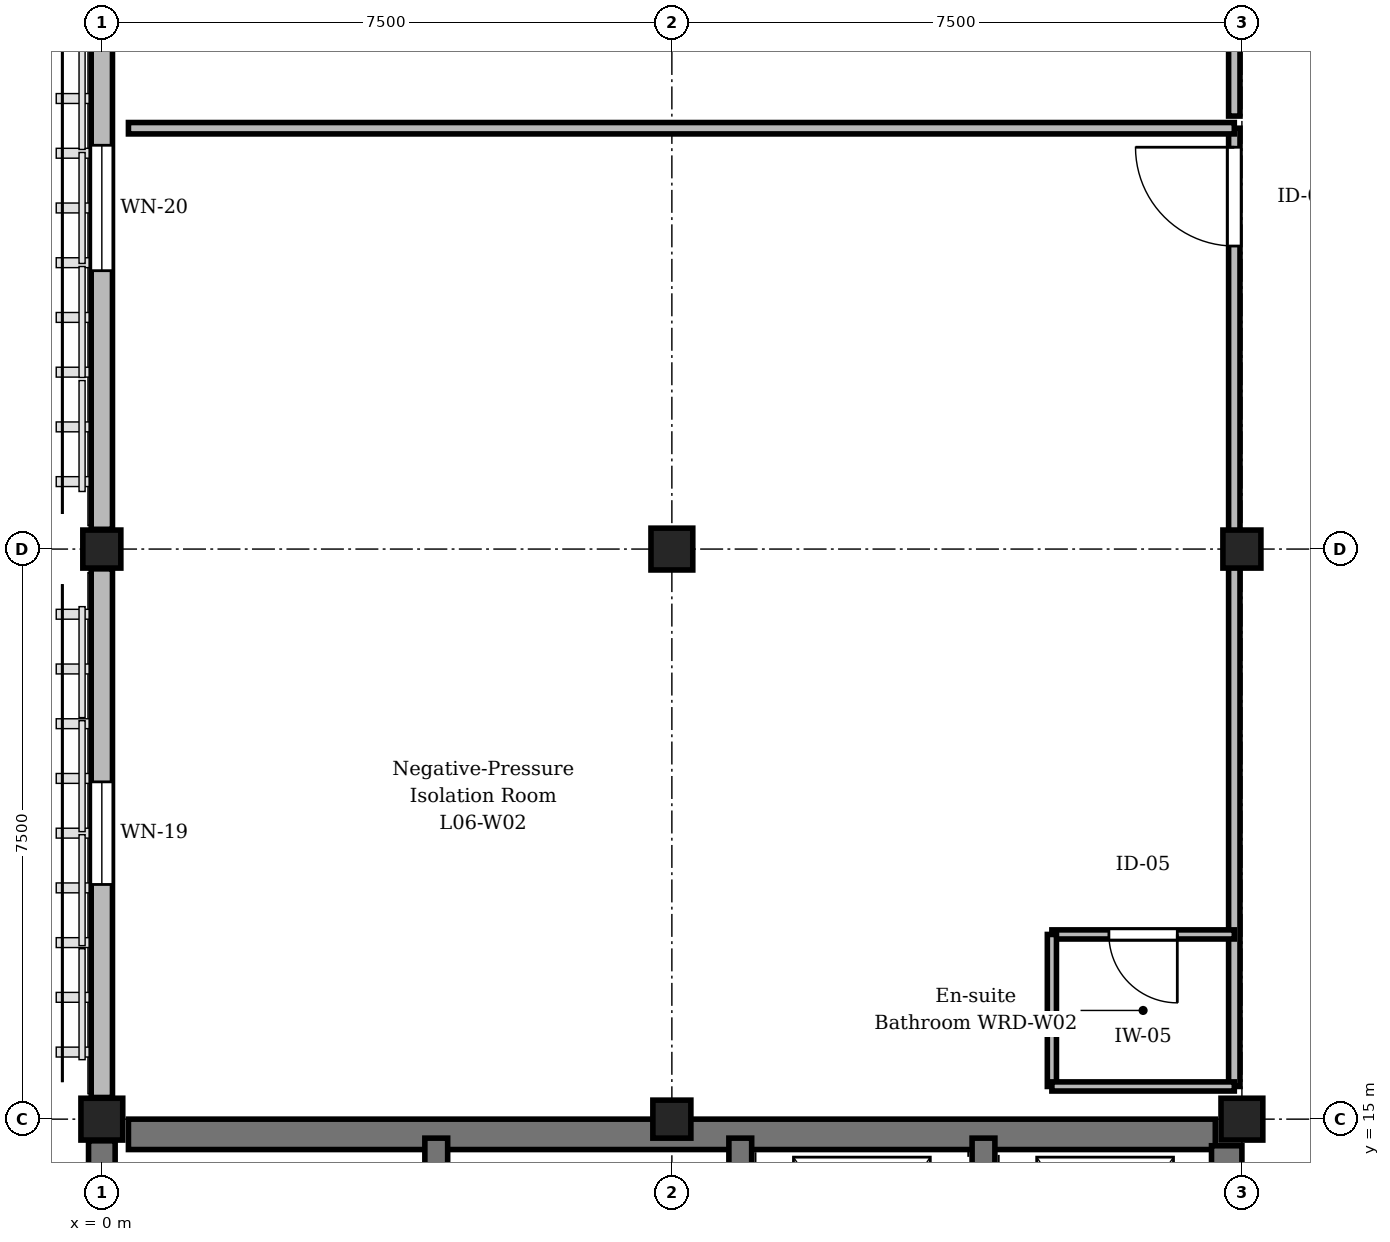
"""IFC4 building model, lengths in metres.
Left out: names, types, materials, properties, quantities, classifications, styles, units other than length and angle.
Written with IfcOpenShell. Run it as: python <this file> out.ifc"""

import sys

from ifc_helpers import new_model, si_unit, direction, frame, frame_2d, origin, origin_2d, place, context, subcontext, project, spatial, rectangle, extrude, element, fill, save


model = new_model("IFC4")
c1 = context("Model", 3, precision=1e-05, world=origin(), true_north=direction((0.0, 1.0)))
c2 = subcontext(c1, "Body", "Model", "MODEL_VIEW")
j1 = project(units=[si_unit("LENGTHUNIT", "METRE"), si_unit("PLANEANGLEUNIT", "RADIAN")], contexts=[c1])
p1 = place(None, origin())
s1 = spatial("IfcSite", under=j1, at=p1, CompositionType="ELEMENT")
p2 = place(p1, origin())
s2 = spatial("IfcBuilding", under=s1, at=p2, CompositionType="ELEMENT")
p3 = place(p2, frame((0.0, 0.0, 25.95)))
s3 = spatial("IfcBuildingStorey", under=s2, at=p3, CompositionType="ELEMENT", Elevation=25.95)
p4 = place(p3, frame((0.0, 15.0, 0.0), z_axis=(0.0, 0.0, 1.0), x_axis=(1.0, 0.0, 0.0)))
e1 = element("IfcColumn", 1, at=p4, inside=s3, PredefinedType="COLUMN", context=c2, shape_type="SweptSolid", body=[
    extrude(rectangle(XDim=0.55, YDim=0.55, at=origin_2d()), origin(), (0.0, 0.0, 1.0), 4.05),
])
for number, where, z_axis, x_axis in (
    (2, (0.0, 22.5, 0.0), (0.0, 0.0, 1.0), (1.0, 0.0, 0.0)),
    (3, (7.5, 15.0, 0.0), (0.0, 0.0, 1.0), (1.0, 0.0, 0.0)),
):
    element("IfcColumn", number, at=place(p3, frame(where, z_axis=z_axis, x_axis=x_axis)), inside=s3, PredefinedType="COLUMN", context=c2, shape_type="SweptSolid", body=[
        extrude(rectangle(XDim=0.5, YDim=0.5, at=origin_2d()), origin(), (0.0, 0.0, 1.0), 4.05),
    ])
for number, where, z_axis, x_axis in (
    (4, (7.5, 22.5, 0.0), (0.0, 0.0, 1.0), (1.0, 0.0, 0.0)),
    (5, (15.0, 15.0, 0.0), (0.0, 0.0, 1.0), (1.0, 0.0, 0.0)),
):
    element("IfcColumn", number, at=place(p3, frame(where, z_axis=z_axis, x_axis=x_axis)), inside=s3, PredefinedType="COLUMN", context=c2, shape_type="SweptSolid", body=[
        extrude(rectangle(XDim=0.55, YDim=0.55, at=origin_2d()), origin(), (0.0, 0.0, 1.0), 4.05),
    ])
p5 = place(p3, frame((15.0, 22.5, 0.0), z_axis=(0.0, 0.0, 1.0), x_axis=(1.0, 0.0, 0.0)))
e6 = element("IfcColumn", 6, at=p5, inside=s3, PredefinedType="COLUMN", context=c2, shape_type="SweptSolid", body=[
    extrude(rectangle(XDim=0.5, YDim=0.5, at=origin_2d()), origin(), (0.0, 0.0, 1.0), 4.05),
])
p6 = place(p3, frame((0.0, 7.76, 0.0), z_axis=(0.0, 0.0, 1.0), x_axis=(0.0, 1.0, 0.0)))
e7 = element("IfcWall", 7, at=p6, inside=s3, PredefinedType="SHEAR", context=c2, shape_type="SweptSolid", body=[
    extrude(rectangle(XDim=6.955, YDim=0.35, at=frame_2d((3.478, 0.0))), origin(), (0.0, 0.0, 1.0), 3.77),
])
p7 = place(p3, frame((0.0, 15.285, 0.0), z_axis=(0.0, 0.0, 1.0), x_axis=(0.0, 1.0, 0.0)))
e8 = element("IfcWall", 8, at=p7, inside=s3, PredefinedType="STANDARD", context=c2, shape_type="SweptSolid", body=[
    extrude(rectangle(XDim=6.955, YDim=0.28, at=frame_2d((3.478, 0.0))), origin(), (0.0, 0.0, 1.0), 3.17),
])
p8 = place(p7, frame((2.802, 0.0, 0.85)))
e9 = element("IfcOpeningElement", 9, at=p8, cuts=e8, PredefinedType="OPENING", context=c2, shape_type="SweptSolid", body=[
    extrude(rectangle(XDim=1.35, YDim=2.04, at=frame_2d((0.675, 1.02))), frame((0.0, 0.15, 0.0), z_axis=(0.0, -1.0, 0.0), x_axis=(1.0, 0.0, 0.0)), (0.0, 0.0, 1.0), 0.3),
])
p9 = place(p3, frame((0.0, 22.76, 0.0), z_axis=(0.0, 0.0, 1.0), x_axis=(0.0, 1.0, 0.0)))
e10 = element("IfcWall", 10, at=p9, inside=s3, PredefinedType="STANDARD", context=c2, shape_type="SweptSolid", body=[
    extrude(rectangle(XDim=8.455, YDim=0.28, at=frame_2d((4.228, 0.0))), origin(), (0.0, 0.0, 1.0), 3.22),
])
p10 = place(p9, frame((3.403, 0.0, 0.85)))
e11 = element("IfcOpeningElement", 11, at=p10, cuts=e10, PredefinedType="OPENING", context=c2, shape_type="SweptSolid", body=[
    extrude(rectangle(XDim=1.65, YDim=2.09, at=frame_2d((0.825, 1.045))), frame((0.0, 0.15, 0.0), z_axis=(0.0, -1.0, 0.0), x_axis=(1.0, 0.0, 0.0)), (0.0, 0.0, 1.0), 0.3),
])
p11 = place(p3, frame((0.35, 14.8, 0.0), z_axis=(0.0, 0.0, 1.0), x_axis=(1.0, 0.0, 0.0)))
e12 = element("IfcWall", 12, at=p11, inside=s3, PredefinedType="SHEAR", context=c2, shape_type="SweptSolid", body=[
    extrude(rectangle(XDim=14.3, YDim=0.4, at=frame_2d((7.15, 0.0))), origin(), (0.0, 0.0, 1.0), 3.77),
])
p12 = place(p3, frame((14.8, 11.6, 0.0), z_axis=(0.0, 0.0, 1.0), x_axis=(0.0, 1.0, 0.0)))
e13 = element("IfcWall", 13, at=p12, inside=s3, PredefinedType="SHEAR", context=c2, shape_type="SweptSolid", body=[
    extrude(rectangle(XDim=3.05, YDim=0.4, at=frame_2d((1.525, 0.0))), origin(), (0.0, 0.0, 1.0), 3.77),
])
for number, where, z_axis, x_axis in (
    (14, (4.4, 11.6, 0.0), (0.0, 0.0, 1.0), (0.0, 1.0, 0.0)),
    (15, (8.4, 11.6, 0.0), (0.0, 0.0, 1.0), (0.0, 1.0, 0.0)),
    (16, (11.6, 11.6, 0.0), (0.0, 0.0, 1.0), (0.0, 1.0, 0.0)),
):
    element("IfcWall", number, at=place(p3, frame(where, z_axis=z_axis, x_axis=x_axis)), inside=s3, PredefinedType="SHEAR", context=c2, shape_type="SweptSolid", body=[
        extrude(rectangle(XDim=3.15, YDim=0.3, at=frame_2d((1.575, 0.0))), origin(), (0.0, 0.0, 1.0), 3.77),
    ])
p13 = place(p3, frame((14.9, 15.43, 0.0), z_axis=(0.0, 0.0, 1.0), x_axis=(0.0, 1.0, 0.0)))
e17 = element("IfcWall", 17, at=p13, inside=s3, PredefinedType="PARTITIONING", context=c2, shape_type="SweptSolid", body=[
    extrude(rectangle(XDim=12.607, YDim=0.15, at=frame_2d((6.303, 0.0))), origin(), (0.0, 0.0, 1.0), 3.055),
])
p14 = place(p13, frame((11.057, 0.0, 0.0)))
e18 = element("IfcOpeningElement", 18, at=p14, cuts=e17, PredefinedType="OPENING", context=c2, shape_type="SweptSolid", body=[
    extrude(rectangle(XDim=1.3, YDim=2.2, at=frame_2d((0.65, 1.1))), frame((0.0, 0.085, 0.0), z_axis=(0.0, -1.0, 0.0), x_axis=(1.0, 0.0, 0.0)), (0.0, 0.0, 1.0), 0.17),
])
p15 = place(p3, frame((14.9, 17.43, 0.0), z_axis=(0.0, 0.0, 1.0), x_axis=(-1.0, 0.0, 0.0)))
e19 = element("IfcWall", 19, at=p15, inside=s3, PredefinedType="PARTITIONING", context=c2, shape_type="SweptSolid", body=[
    extrude(rectangle(XDim=2.4, YDim=0.12, at=frame_2d((1.2, 0.0))), origin(), (0.0, 0.0, 1.0), 3.755),
])
p16 = place(p15, frame((0.75, 0.0, 0.0)))
e20 = element("IfcOpeningElement", 20, at=p16, cuts=e19, PredefinedType="OPENING", context=c2, shape_type="SweptSolid", body=[
    extrude(rectangle(XDim=0.9, YDim=2.1, at=frame_2d((0.45, 1.05))), frame((0.0, 0.07, 0.0), z_axis=(0.0, -1.0, 0.0), x_axis=(1.0, 0.0, 0.0)), (0.0, 0.0, 1.0), 0.14),
])
p17 = place(p3, frame((12.5, 15.43, 0.0), z_axis=(0.0, 0.0, 1.0), x_axis=(0.0, 1.0, 0.0)))
e21 = element("IfcWall", 21, at=p17, inside=s3, PredefinedType="PARTITIONING", context=c2, shape_type="SweptSolid", body=[
    extrude(rectangle(XDim=2.0, YDim=0.12, at=frame_2d((1.0, 0.0))), origin(), (0.0, 0.0, 1.0), 3.755),
])
p18 = place(p3, frame((14.9, 28.197, 0.0), z_axis=(0.0, 0.0, 1.0), x_axis=(0.0, 1.0, 0.0)))
e22 = element("IfcWall", 22, at=p18, inside=s3, PredefinedType="PARTITIONING", context=c2, shape_type="SweptSolid", body=[
    extrude(rectangle(XDim=12.606, YDim=0.15, at=frame_2d((6.303, 0.0))), origin(), (0.0, 0.0, 1.0), 3.055),
])
p19 = place(p18, frame((6.704, 0.0, 0.0)))
e23 = element("IfcOpeningElement", 23, at=p19, cuts=e22, PredefinedType="OPENING", context=c2, shape_type="SweptSolid", body=[
    extrude(rectangle(XDim=1.35, YDim=2.25, at=frame_2d((0.675, 1.125))), frame((0.0, 0.085, 0.0), z_axis=(0.0, -1.0, 0.0), x_axis=(1.0, 0.0, 0.0)), (0.0, 0.0, 1.0), 0.17),
])
p20 = place(p3, frame((0.35, 28.037, 0.0), z_axis=(0.0, 0.0, 1.0), x_axis=(1.0, 0.0, 0.0)))
e24 = element("IfcWall", 24, at=p20, inside=s3, PredefinedType="PARTITIONING", context=c2, shape_type="SweptSolid", body=[
    extrude(rectangle(XDim=14.55, YDim=0.15, at=frame_2d((7.275, 0.0))), origin(), (0.0, 0.0, 1.0), 3.755),
])
p21 = place(p3, frame((12.5, 15.43, 0.0), z_axis=(0.0, 0.0, 1.0), x_axis=(1.0, 0.0, 0.0)))
e25 = element("IfcWall", 25, at=p21, inside=s3, PredefinedType="PARTITIONING", context=c2, shape_type="SweptSolid", body=[
    extrude(rectangle(XDim=2.4, YDim=0.12, at=frame_2d((1.2, 0.0))), origin(), (0.0, 0.0, 1.0), 3.755),
])
p22 = place(p8, origin())
e26 = element("IfcWindow", 26, at=p22, inside=s3, PartitioningType="SINGLE_PANEL", PredefinedType="WINDOW", context=c2, shape_type="SweptSolid", body=[
    extrude(rectangle(XDim=1.35, YDim=2.04, at=frame_2d((0.675, 1.02))), frame((0.0, 0.03, 0.0), z_axis=(0.0, -1.0, 0.0), x_axis=(1.0, 0.0, 0.0)), (0.0, 0.0, 1.0), 0.06),
])
fill(e9, e26)
p23 = place(p10, origin())
e27 = element("IfcWindow", 27, at=p23, inside=s3, PartitioningType="SINGLE_PANEL", PredefinedType="WINDOW", context=c2, shape_type="SweptSolid", body=[
    extrude(rectangle(XDim=1.65, YDim=2.09, at=frame_2d((0.825, 1.045))), frame((0.0, 0.03, 0.0), z_axis=(0.0, -1.0, 0.0), x_axis=(1.0, 0.0, 0.0)), (0.0, 0.0, 1.0), 0.06),
])
fill(e11, e27)
p24 = place(p14, origin())
e28 = element("IfcDoor", 28, at=p24, inside=s3, OperationType="SINGLE_SWING_RIGHT", PredefinedType="DOOR", context=c2, shape_type="SweptSolid", body=[
    extrude(rectangle(XDim=1.3, YDim=2.2, at=frame_2d((0.65, 1.1))), frame((0.0, 0.025, 0.0), z_axis=(0.0, -1.0, 0.0), x_axis=(1.0, 0.0, 0.0)), (0.0, 0.0, 1.0), 0.05),
])
fill(e18, e28)
p25 = place(p16, origin())
e29 = element("IfcDoor", 29, at=p25, inside=s3, OperationType="SINGLE_SWING_LEFT", PredefinedType="DOOR", context=c2, shape_type="SweptSolid", body=[
    extrude(rectangle(XDim=0.9, YDim=2.1, at=frame_2d((0.45, 1.05))), frame((0.0, 0.025, 0.0), z_axis=(0.0, -1.0, 0.0), x_axis=(1.0, 0.0, 0.0)), (0.0, 0.0, 1.0), 0.05),
])
fill(e20, e29)
save(model, sys.argv[1])
